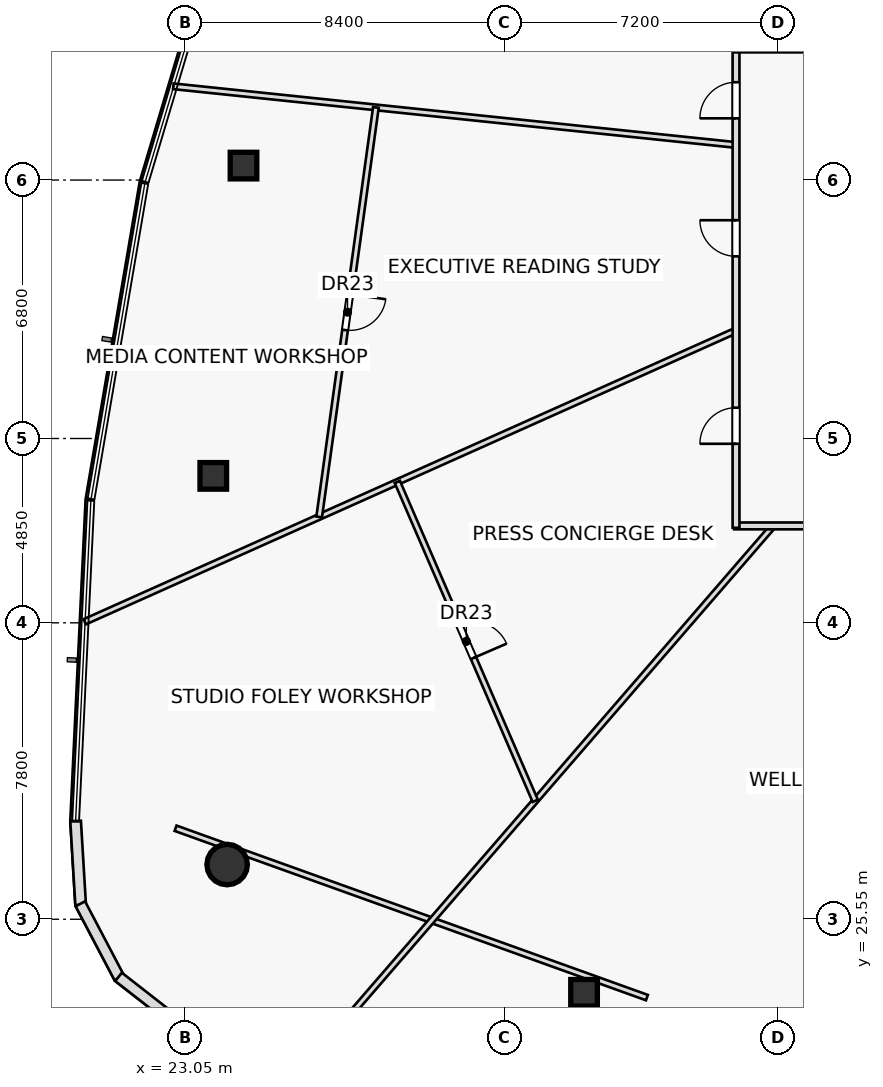
"""IFC4 building model, lengths in metres.
Left out: names, types, materials, properties, quantities, classifications, styles, units other than length and angle.
Written with IfcOpenShell. Run it as: python <this file> out.ifc"""

import sys

from ifc_helpers import new_model, si_unit, direction, frame, frame_2d, origin, origin_2d, place, context, subcontext, project, spatial, rectangle, hollow_rectangle, hollow_circle, extrude, element, fill, save


model = new_model("IFC4")
c1 = context("Model", 3, precision=1e-05, world=origin(), true_north=direction((0.0, 1.0)))
c2 = subcontext(c1, "Body", "Model", "MODEL_VIEW")
j1 = project(units=[si_unit("LENGTHUNIT", "METRE"), si_unit("PLANEANGLEUNIT", "RADIAN")], contexts=[c1])
p1 = place(None, origin())
s1 = spatial("IfcSite", under=j1, at=p1, CompositionType="ELEMENT")
p2 = place(p1, origin())
s2 = spatial("IfcBuilding", under=s1, at=p2, CompositionType="ELEMENT")
p3 = place(p2, frame((0.0, 0.0, 66.6)))
s3 = spatial("IfcBuildingStorey", under=s2, at=p3, CompositionType="ELEMENT", Elevation=66.6)
for number, where, z_axis, x_axis in (
    (1, (24.59, 45.381, 0.0), (0.0, 0.0, 1.0), (1.0, 0.0, 0.0)),
    (2, (23.795, 37.216, 0.0), (0.0, 0.0, 1.0), (1.0, 0.0, 0.0)),
):
    element("IfcColumn", number, at=place(p3, frame(where, z_axis=z_axis, x_axis=x_axis)), inside=s3, PredefinedType="COLUMN", context=c2, shape_type="SweptSolid", body=[
        extrude(hollow_rectangle(XDim=0.7, YDim=0.7, WallThickness=0.04, at=origin_2d()), origin(), (0.0, 0.0, 1.0), 3.6),
    ])
p4 = place(p3, frame((24.159, 26.99, 0.0), z_axis=(0.0, 0.0, 1.0), x_axis=(1.0, 0.0, 0.0)))
e3 = element("IfcColumn", 3, at=p4, inside=s3, PredefinedType="COLUMN", context=c2, shape_type="SweptSolid", body=[
    extrude(hollow_circle(Radius=0.533, WallThickness=0.045, at=origin_2d()), origin(), (0.0, 0.0, 1.0), 3.6),
])
p5 = place(p3, frame((33.551, 23.615, 0.0), z_axis=(0.0, 0.0, 1.0), x_axis=(1.0, 0.0, 0.0)))
e4 = element("IfcColumn", 4, at=p5, inside=s3, PredefinedType="COLUMN", context=c2, shape_type="SweptSolid", body=[
    extrude(hollow_rectangle(XDim=0.7, YDim=0.7, WallThickness=0.04, at=origin_2d()), origin(), (0.0, 0.0, 1.0), 3.6),
])
p6 = place(p3, frame((22.802, 27.945, 0.0), z_axis=(0.0, 0.0, 1.0), x_axis=(0.941102349209, -0.338121824662, 0.0)))
e5 = element("IfcWall", 5, at=p6, inside=s3, PredefinedType="PARTITIONING", context=c2, shape_type="SweptSolid", body=[
    extrude(rectangle(XDim=13.18, YDim=0.15, at=frame_2d((6.59, 0.0))), origin(), (0.0, 0.0, 1.0), 2.975),
])
p7 = place(p3, frame((37.55, 45.923, 0.0), z_axis=(0.0, 0.0, 1.0), x_axis=(-0.994605726754, 0.103727760548, 0.0)))
e6 = element("IfcWall", 6, at=p7, inside=s3, PredefinedType="PARTITIONING", context=c2, shape_type="SweptSolid", body=[
    extrude(rectangle(XDim=14.887, YDim=0.15, at=frame_2d((7.443, 0.0))), origin(), (0.0, 0.0, 1.0), 2.975),
])
p8 = place(p3, frame((37.55, 41.042, 0.0), z_axis=(0.0, 0.0, 1.0), x_axis=(-0.912858301538, -0.408276525547, 0.0)))
e7 = element("IfcWall", 7, at=p8, inside=s3, PredefinedType="PARTITIONING", context=c2, shape_type="SweptSolid", body=[
    extrude(rectangle(XDim=18.775, YDim=0.15, at=frame_2d((9.387, 0.0))), origin(), (0.0, 0.0, 1.0), 2.975),
])
p9 = place(p3, frame((38.526, 35.9, 0.0), z_axis=(0.0, 0.0, 1.0), x_axis=(-0.654320997638, -0.756216921293, 0.0)))
e8 = element("IfcWall", 8, at=p9, inside=s3, PredefinedType="PARTITIONING", context=c2, shape_type="SweptSolid", body=[
    extrude(rectangle(XDim=18.396, YDim=0.15, at=frame_2d((9.198, 0.0))), origin(), (0.0, 0.0, 1.0), 2.975),
])
p10 = place(p3, frame((28.074, 46.911, 0.0), z_axis=(0.0, 0.0, 1.0), x_axis=(-0.137197100967, -0.990543767577, 0.0)))
e9 = element("IfcWall", 9, at=p10, inside=s3, PredefinedType="PARTITIONING", context=c2, shape_type="SweptSolid", body=[
    extrude(rectangle(XDim=10.878, YDim=0.15, at=frame_2d((5.439, 0.0))), origin(), (0.0, 0.0, 1.0), 2.975),
])
p11 = place(p10, frame((4.964, 0.0, 0.0)))
e10 = element("IfcOpeningElement", 10, at=p11, cuts=e9, PredefinedType="OPENING", context=c2, shape_type="SweptSolid", body=[
    extrude(rectangle(XDim=0.95, YDim=2.05, at=frame_2d((0.475, 1.025))), frame((0.0, 0.085, 0.0), z_axis=(0.0, -1.0, 0.0), x_axis=(1.0, 0.0, 0.0)), (0.0, 0.0, 1.0), 0.17),
])
p12 = place(p3, frame((28.638, 37.056, 0.0), z_axis=(0.0, 0.0, 1.0), x_axis=(0.396979257651, -0.9178275813, 0.0)))
e11 = element("IfcWall", 11, at=p12, inside=s3, PredefinedType="PARTITIONING", context=c2, shape_type="SweptSolid", body=[
    extrude(rectangle(XDim=9.141, YDim=0.15, at=frame_2d((4.571, 0.0))), origin(), (0.0, 0.0, 1.0), 2.975),
])
p13 = place(p12, frame((4.096, 0.0, 0.0)))
e12 = element("IfcOpeningElement", 12, at=p13, cuts=e11, PredefinedType="OPENING", context=c2, shape_type="SweptSolid", body=[
    extrude(rectangle(XDim=0.95, YDim=2.05, at=frame_2d((0.475, 1.025))), frame((0.0, 0.085, 0.0), z_axis=(0.0, -1.0, 0.0), x_axis=(1.0, 0.0, 0.0)), (0.0, 0.0, 1.0), 0.17),
])
p14 = place(p3, frame((59.55, 35.9, 0.0), z_axis=(0.0, 0.0, 1.0), x_axis=(-1.0, 0.0, 0.0)))
e13 = element("IfcWall", 13, at=p14, inside=s3, PredefinedType="PARTITIONING", context=c2, shape_type="SweptSolid", body=[
    extrude(rectangle(XDim=22.05, YDim=0.18, at=frame_2d((11.025, 0.0))), origin(), (0.0, 0.0, 1.0), 2.975),
])
p15 = place(p14, frame((5.11, 0.0, 0.0)))
e14 = element("IfcOpeningElement", 14, at=p15, cuts=e13, PredefinedType="OPENING", context=c2, shape_type="SweptSolid", body=[
    extrude(rectangle(XDim=0.95, YDim=2.05, at=frame_2d((0.475, 1.025))), frame((0.0, 0.1, 0.0), z_axis=(0.0, -1.0, 0.0), x_axis=(1.0, 0.0, 0.0)), (0.0, 0.0, 1.0), 0.2),
])
p16 = place(p14, frame((15.55, 0.0, 0.0)))
e15 = element("IfcOpeningElement", 15, at=p16, cuts=e13, PredefinedType="OPENING", context=c2, shape_type="SweptSolid", body=[
    extrude(rectangle(XDim=0.95, YDim=2.05, at=frame_2d((0.475, 1.025))), frame((0.0, 0.1, 0.0), z_axis=(0.0, -1.0, 0.0), x_axis=(1.0, 0.0, 0.0)), (0.0, 0.0, 1.0), 0.2),
])
p17 = place(p3, frame((37.55, 35.85, 0.0), z_axis=(0.0, 0.0, 1.0), x_axis=(0.0, 1.0, 0.0)))
e16 = element("IfcWall", 16, at=p17, inside=s3, PredefinedType="PARTITIONING", context=c2, shape_type="SweptSolid", body=[
    extrude(rectangle(XDim=12.65, YDim=0.18, at=frame_2d((6.325, 0.0))), origin(), (0.0, 0.0, 1.0), 2.975),
])
p18 = place(p17, frame((2.211, 0.0, 0.0)))
e17 = element("IfcOpeningElement", 17, at=p18, cuts=e16, PredefinedType="OPENING", context=c2, shape_type="SweptSolid", body=[
    extrude(rectangle(XDim=0.95, YDim=2.05, at=frame_2d((0.475, 1.025))), frame((0.0, 0.1, 0.0), z_axis=(0.0, -1.0, 0.0), x_axis=(1.0, 0.0, 0.0)), (0.0, 0.0, 1.0), 0.2),
])
p19 = place(p17, frame((7.143, 0.0, 0.0)))
e18 = element("IfcOpeningElement", 18, at=p19, cuts=e16, PredefinedType="OPENING", context=c2, shape_type="SweptSolid", body=[
    extrude(rectangle(XDim=0.95, YDim=2.05, at=frame_2d((0.475, 1.025))), frame((0.0, 0.1, 0.0), z_axis=(0.0, -1.0, 0.0), x_axis=(1.0, 0.0, 0.0)), (0.0, 0.0, 1.0), 0.2),
])
p20 = place(p17, frame((10.774, 0.0, 0.0)))
e19 = element("IfcOpeningElement", 19, at=p20, cuts=e16, PredefinedType="OPENING", context=c2, shape_type="SweptSolid", body=[
    extrude(rectangle(XDim=0.95, YDim=2.05, at=frame_2d((0.475, 1.025))), frame((0.0, 0.1, 0.0), z_axis=(0.0, -1.0, 0.0), x_axis=(1.0, 0.0, 0.0)), (0.0, 0.0, 1.0), 0.2),
])
p21 = place(p3, frame((20.172, 28.134, 0.0), z_axis=(0.0, 0.0, 1.0), x_axis=(0.060094822276, -0.998192672952, 0.0)))
e20 = element("IfcWall", 20, at=p21, inside=s3, PredefinedType="STANDARD", context=c2, shape_type="SweptSolid", body=[
    extrude(rectangle(XDim=2.21, YDim=0.28, at=frame_2d((1.105, 0.0))), origin(), (0.0, 0.0, 1.0), 3.6),
])
for number, where, z_axis, x_axis in (
    (21, (20.297, 25.956, 0.0), (0.0, 0.0, 1.0), (0.466, -0.885, 0.0)),
    (22, (21.302, 24.033, 0.0), (0.0, 0.0, 1.0), (0.789, -0.615, 0.0)),
):
    element("IfcWall", number, at=place(p3, frame(where, z_axis=z_axis, x_axis=x_axis)), inside=s3, PredefinedType="STANDARD", context=c2, shape_type="SweptSolid", body=[
        extrude(rectangle(XDim=2.198, YDim=0.28, at=frame_2d((1.099, 0.0))), origin(), (0.0, 0.0, 1.0), 3.6),
    ])
p22 = place(p11, origin())
e23 = element("IfcDoor", 23, at=p22, inside=s3, OperationType="SINGLE_SWING_LEFT", PredefinedType="DOOR", context=c2, shape_type="SweptSolid", body=[
    extrude(rectangle(XDim=0.95, YDim=2.05, at=frame_2d((0.475, 1.025))), frame((0.0, 0.025, 0.0), z_axis=(0.0, -1.0, 0.0), x_axis=(1.0, 0.0, 0.0)), (0.0, 0.0, 1.0), 0.05),
])
fill(e10, e23)
p23 = place(p13, origin())
e24 = element("IfcDoor", 24, at=p23, inside=s3, OperationType="SINGLE_SWING_RIGHT", PredefinedType="DOOR", context=c2, shape_type="SweptSolid", body=[
    extrude(rectangle(XDim=0.95, YDim=2.05, at=frame_2d((0.475, 1.025))), frame((0.0, 0.025, 0.0), z_axis=(0.0, -1.0, 0.0), x_axis=(1.0, 0.0, 0.0)), (0.0, 0.0, 1.0), 0.05),
])
fill(e12, e24)
p24 = place(p18, origin())
e25 = element("IfcDoor", 25, at=p24, inside=s3, OperationType="SINGLE_SWING_LEFT", PredefinedType="DOOR", context=c2, shape_type="SweptSolid", body=[
    extrude(rectangle(XDim=0.95, YDim=2.05, at=frame_2d((0.475, 1.025))), frame((0.0, 0.025, 0.0), z_axis=(0.0, -1.0, 0.0), x_axis=(1.0, 0.0, 0.0)), (0.0, 0.0, 1.0), 0.05),
])
fill(e17, e25)
p25 = place(p19, origin())
e26 = element("IfcDoor", 26, at=p25, inside=s3, OperationType="SINGLE_SWING_RIGHT", PredefinedType="DOOR", context=c2, shape_type="SweptSolid", body=[
    extrude(rectangle(XDim=0.95, YDim=2.05, at=frame_2d((0.475, 1.025))), frame((0.0, 0.025, 0.0), z_axis=(0.0, -1.0, 0.0), x_axis=(1.0, 0.0, 0.0)), (0.0, 0.0, 1.0), 0.05),
])
fill(e18, e26)
p26 = place(p20, origin())
e27 = element("IfcDoor", 27, at=p26, inside=s3, OperationType="SINGLE_SWING_LEFT", PredefinedType="DOOR", context=c2, shape_type="SweptSolid", body=[
    extrude(rectangle(XDim=0.95, YDim=2.05, at=frame_2d((0.475, 1.025))), frame((0.0, 0.025, 0.0), z_axis=(0.0, -1.0, 0.0), x_axis=(1.0, 0.0, 0.0)), (0.0, 0.0, 1.0), 0.05),
])
fill(e19, e27)
save(model, sys.argv[1])
